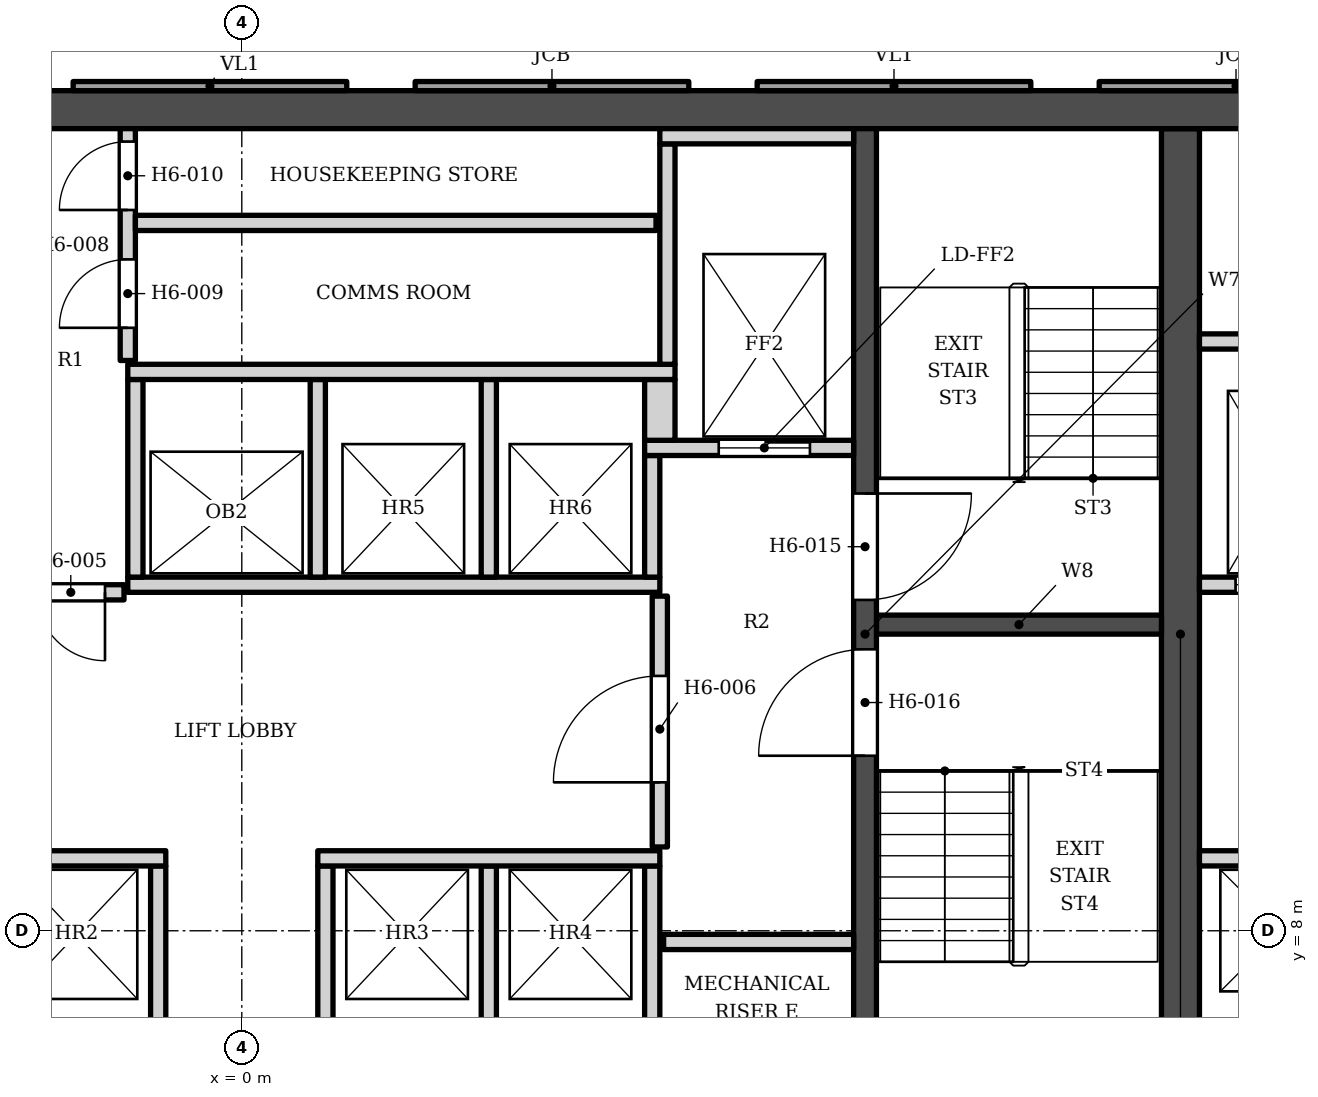
"""IFC4 building model, lengths in metres.
Left out: names, types, materials, properties, quantities, classifications, styles, units other than length and angle.
Written with IfcOpenShell. Run it as: python <this file> out.ifc"""

import sys

from ifc_helpers import new_model, si_unit, direction, frame, frame_2d, origin, place, context, subcontext, project, spatial, polyline, rectangle, outline, extrude, element, fill, save


model = new_model("IFC4")
c1 = context("Model", 3, precision=1e-05, world=origin(), true_north=direction((0.0, 1.0)))
c2 = subcontext(c1, "Body", "Model", "MODEL_VIEW")
j1 = project(units=[si_unit("LENGTHUNIT", "METRE"), si_unit("PLANEANGLEUNIT", "RADIAN")], contexts=[c1])
p1 = place(None, origin())
s1 = spatial("IfcSite", under=j1, at=p1, CompositionType="ELEMENT")
p2 = place(p1, origin())
s2 = spatial("IfcBuilding", under=s1, at=p2, CompositionType="ELEMENT")
p3 = place(p2, frame((0.0, 0.0, 102.0)))
s3 = spatial("IfcBuildingStorey", under=s2, at=p3, CompositionType="ELEMENT", Elevation=102.0)
p4 = place(p3, frame((-16.9, 18.802, 0.0), z_axis=(0.0, 0.0, 1.0), x_axis=(1.0, 0.0, 0.0)))
e1 = element("IfcWall", 1, at=p4, inside=s3, PredefinedType="SHEAR", context=c2, shape_type="SweptSolid", body=[
    extrude(rectangle(XDim=33.8, YDim=0.5, at=frame_2d((16.9, 0.0))), origin(), (0.0, 0.0, 1.0), 3.4),
])
p5 = place(p3, frame((12.35, 5.253, 0.0), z_axis=(0.0, 0.0, 1.0), x_axis=(0.0, 1.0, 0.0)))
e2 = element("IfcWall", 2, at=p5, inside=s3, PredefinedType="SHEAR", context=c2, shape_type="SweptSolid", body=[
    extrude(rectangle(XDim=13.3, YDim=0.5, at=frame_2d((6.65, 0.0))), origin(), (0.0, 0.0, 1.0), 3.4),
])
p6 = place(p3, frame((8.2, 5.253, 0.0), z_axis=(0.0, 0.0, 1.0), x_axis=(0.0, 1.0, 0.0)))
e3 = element("IfcWall", 3, at=p6, inside=s3, PredefinedType="SHEAR", context=c2, shape_type="SweptSolid", body=[
    extrude(rectangle(XDim=13.3, YDim=0.3, at=frame_2d((6.65, 0.0))), origin(), (0.0, 0.0, 1.0), 3.4),
])
p7 = place(p6, frame((7.1, 0.0, 0.0)))
e4 = element("IfcOpeningElement", 4, at=p7, cuts=e3, PredefinedType="OPENING", context=c2, shape_type="SweptSolid", body=[
    extrude(rectangle(XDim=1.4, YDim=2.1, at=frame_2d((0.7, 1.05))), frame((0.0, 0.16, 0.0), z_axis=(0.0, -1.0, 0.0), x_axis=(1.0, 0.0, 0.0)), (0.0, 0.0, 1.0), 0.32),
])
p8 = place(p6, frame((5.05, 0.0, 0.0)))
e5 = element("IfcOpeningElement", 5, at=p8, cuts=e3, PredefinedType="OPENING", context=c2, shape_type="SweptSolid", body=[
    extrude(rectangle(XDim=1.4, YDim=2.1, at=frame_2d((0.7, 1.05))), frame((0.0, 0.16, 0.0), z_axis=(0.0, -1.0, 0.0), x_axis=(1.0, 0.0, 0.0)), (0.0, 0.0, 1.0), 0.32),
])
p9 = place(p3, frame((8.35, 12.028, 0.0), z_axis=(0.0, 0.0, 1.0), x_axis=(1.0, 0.0, 0.0)))
e6 = element("IfcWall", 6, at=p9, inside=s3, PredefinedType="SHEAR", context=c2, shape_type="SweptSolid", body=[
    extrude(rectangle(XDim=3.75, YDim=0.25, at=frame_2d((1.875, 0.0))), origin(), (0.0, 0.0, 1.0), 3.4),
])
p10 = place(p3, origin())
e7 = element("IfcWall", 7, at=p10, inside=s3, PredefinedType="SOLIDWALL", context=c2, shape_type="SweptSolid", body=[
    extrude(outline(polyline([(11.281, 19.173), (11.281, 19.052), (14.881, 19.052), (14.881, 19.173), (11.281, 19.173)])), origin(), (0.0, 0.0, 1.0), 2.65),
])
p11 = place(p3, origin())
e8 = element("IfcWall", 8, at=p11, inside=s3, PredefinedType="ELEMENTEDWALL", context=c2, shape_type="SweptSolid", body=[
    extrude(outline(polyline([(6.781, 19.173), (6.781, 19.052), (10.381, 19.052), (10.381, 19.173), (6.781, 19.173)])), origin(), (0.0, 0.0, 1.0), 2.65),
])
p12 = place(p3, origin())
e9 = element("IfcWall", 9, at=p12, inside=s3, PredefinedType="SOLIDWALL", context=c2, shape_type="SweptSolid", body=[
    extrude(outline(polyline([(2.281, 19.173), (2.281, 19.052), (5.881, 19.052), (5.881, 19.173), (2.281, 19.173)])), origin(), (0.0, 0.0, 1.0), 2.65),
])
p13 = place(p3, origin())
e10 = element("IfcWall", 10, at=p13, inside=s3, PredefinedType="ELEMENTEDWALL", context=c2, shape_type="SweptSolid", body=[
    extrude(outline(polyline([(-2.219, 19.173), (-2.219, 19.052), (1.381, 19.052), (1.381, 19.173), (-2.219, 19.173)])), origin(), (0.0, 0.0, 1.0), 2.65),
])
for number, where, z_axis, x_axis in (
    (11, (-1.1, 6.353, 0.0), (0.0, 0.0, 1.0), (0.0, 1.0, 0.0)),
    (12, (1.1, 6.353, 0.0), (0.0, 0.0, 1.0), (0.0, 1.0, 0.0)),
    (13, (3.25, 6.353, 0.0), (0.0, 0.0, 1.0), (0.0, 1.0, 0.0)),
    (14, (5.4, 6.353, 0.0), (0.0, 0.0, 1.0), (0.0, 1.0, 0.0)),
    (15, (5.55, 7.853, 0.0), (0.0, 0.0, 1.0), (1.0, 0.0, 0.0)),
):
    element("IfcWall", number, at=place(p3, frame(where, z_axis=z_axis, x_axis=x_axis)), inside=s3, PredefinedType="SOLIDWALL", context=c2, shape_type="SweptSolid", body=[
        extrude(rectangle(XDim=2.5, YDim=0.2, at=frame_2d((1.25, 0.0))), origin(), (0.0, 0.0, 1.0), 3.23),
    ])
for number, where, z_axis, x_axis in (
    (16, (-5.5, 8.953, 0.0), (0.0, 0.0, 1.0), (1.0, 0.0, 0.0)),
    (17, (1.0, 8.953, 0.0), (0.0, 0.0, 1.0), (1.0, 0.0, 0.0)),
):
    element("IfcWall", number, at=place(p3, frame(where, z_axis=z_axis, x_axis=x_axis)), inside=s3, PredefinedType="SOLIDWALL", context=c2, shape_type="SweptSolid", body=[
        extrude(rectangle(XDim=4.5, YDim=0.2, at=frame_2d((2.25, 0.0))), origin(), (0.0, 0.0, 1.0), 3.23),
    ])
p14 = place(p3, frame((12.6, 8.953, 0.0), z_axis=(0.0, 0.0, 1.0), x_axis=(1.0, 0.0, 0.0)))
e18 = element("IfcWall", 18, at=p14, inside=s3, PredefinedType="SOLIDWALL", context=c2, shape_type="SweptSolid", body=[
    extrude(rectangle(XDim=4.3, YDim=0.2, at=frame_2d((2.15, 0.0))), origin(), (0.0, 0.0, 1.0), 3.23),
])
p15 = place(p14, frame((0.525, 0.0, 0.0)))
e19 = element("IfcOpeningElement", 19, at=p15, cuts=e18, PredefinedType="OPENING", context=c2, shape_type="SweptSolid", body=[
    extrude(rectangle(XDim=1.1, YDim=2.1, at=frame_2d((0.55, 1.05))), frame((0.0, 0.11, 0.0), z_axis=(0.0, -1.0, 0.0), x_axis=(1.0, 0.0, 0.0)), (0.0, 0.0, 1.0), 0.22),
])
p16 = place(p14, frame((2.775, 0.0, 0.0)))
e20 = element("IfcOpeningElement", 20, at=p16, cuts=e18, PredefinedType="OPENING", context=c2, shape_type="SweptSolid", body=[
    extrude(rectangle(XDim=1.1, YDim=2.1, at=frame_2d((0.55, 1.05))), frame((0.0, 0.11, 0.0), z_axis=(0.0, -1.0, 0.0), x_axis=(1.0, 0.0, 0.0)), (0.0, 0.0, 1.0), 0.22),
])
p17 = place(p3, frame((5.5, 9.103, 0.0), z_axis=(0.0, 0.0, 1.0), x_axis=(0.0, 1.0, 0.0)))
e21 = element("IfcWall", 21, at=p17, inside=s3, PredefinedType="SOLIDWALL", context=c2, shape_type="SweptSolid", body=[
    extrude(rectangle(XDim=3.3, YDim=0.2, at=frame_2d((1.65, 0.0))), origin(), (0.0, 0.0, 1.0), 3.23),
])
p18 = place(p17, frame((0.85, 0.0, 0.0)))
e22 = element("IfcOpeningElement", 22, at=p18, cuts=e21, PredefinedType="OPENING", context=c2, shape_type="SweptSolid", body=[
    extrude(rectangle(XDim=1.4, YDim=2.1, at=frame_2d((0.7, 1.05))), frame((0.0, 0.11, 0.0), z_axis=(0.0, -1.0, 0.0), x_axis=(1.0, 0.0, 0.0)), (0.0, 0.0, 1.0), 0.22),
])
p19 = place(p3, frame((-2.95, 12.453, 0.0), z_axis=(0.0, 0.0, 1.0), x_axis=(1.0, 0.0, 0.0)))
e23 = element("IfcWall", 23, at=p19, inside=s3, PredefinedType="SOLIDWALL", context=c2, shape_type="SweptSolid", body=[
    extrude(rectangle(XDim=1.4, YDim=0.2, at=frame_2d((0.7, 0.0))), origin(), (0.0, 0.0, 1.0), 3.23),
])
p20 = place(p19, frame((0.25, 0.0, 0.0)))
e24 = element("IfcOpeningElement", 24, at=p20, cuts=e23, PredefinedType="OPENING", context=c2, shape_type="SweptSolid", body=[
    extrude(rectangle(XDim=0.9, YDim=2.1, at=frame_2d((0.45, 1.05))), frame((0.0, 0.11, 0.0), z_axis=(0.0, -1.0, 0.0), x_axis=(1.0, 0.0, 0.0)), (0.0, 0.0, 1.0), 0.22),
])
p21 = place(p3, frame((-1.5, 12.552, 0.0), z_axis=(0.0, 0.0, 1.0), x_axis=(1.0, 0.0, 0.0)))
e25 = element("IfcWall", 25, at=p21, inside=s3, PredefinedType="SOLIDWALL", context=c2, shape_type="SweptSolid", body=[
    extrude(rectangle(XDim=7.0, YDim=0.2, at=frame_2d((3.5, 0.0))), origin(), (0.0, 0.0, 1.0), 3.23),
])
p22 = place(p3, frame((12.6, 12.552, 0.0), z_axis=(0.0, 0.0, 1.0), x_axis=(1.0, 0.0, 0.0)))
e26 = element("IfcWall", 26, at=p22, inside=s3, PredefinedType="SOLIDWALL", context=c2, shape_type="SweptSolid", body=[
    extrude(rectangle(XDim=4.3, YDim=0.2, at=frame_2d((2.15, 0.0))), origin(), (0.0, 0.0, 1.0), 3.23),
])
p23 = place(p22, frame((0.475, 0.0, 0.0)))
e27 = element("IfcOpeningElement", 27, at=p23, cuts=e26, PredefinedType="OPENING", context=c2, shape_type="SweptSolid", body=[
    extrude(rectangle(XDim=1.2, YDim=2.1, at=frame_2d((0.6, 1.05))), frame((0.0, 0.11, 0.0), z_axis=(0.0, -1.0, 0.0), x_axis=(1.0, 0.0, 0.0)), (0.0, 0.0, 1.0), 0.22),
])
p24 = place(p22, frame((2.625, 0.0, 0.0)))
e28 = element("IfcOpeningElement", 28, at=p24, cuts=e26, PredefinedType="OPENING", context=c2, shape_type="SweptSolid", body=[
    extrude(rectangle(XDim=1.4, YDim=2.1, at=frame_2d((0.7, 1.05))), frame((0.0, 0.11, 0.0), z_axis=(0.0, -1.0, 0.0), x_axis=(1.0, 0.0, 0.0)), (0.0, 0.0, 1.0), 0.22),
])
for number, where, z_axis, x_axis in (
    (29, (-1.4, 12.653, 0.0), (0.0, 0.0, 1.0), (0.0, 1.0, 0.0)),
    (30, (1.0, 12.653, 0.0), (0.0, 0.0, 1.0), (0.0, 1.0, 0.0)),
    (31, (3.25, 12.653, 0.0), (0.0, 0.0, 1.0), (0.0, 1.0, 0.0)),
):
    element("IfcWall", number, at=place(p3, frame(where, z_axis=z_axis, x_axis=x_axis)), inside=s3, PredefinedType="SOLIDWALL", context=c2, shape_type="SweptSolid", body=[
        extrude(rectangle(XDim=2.6, YDim=0.2, at=frame_2d((1.3, 0.0))), origin(), (0.0, 0.0, 1.0), 3.23),
    ])
p25 = place(p3, frame((5.4, 12.653, 0.0), z_axis=(0.0, 0.0, 1.0), x_axis=(0.0, 1.0, 0.0)))
e32 = element("IfcWall", 32, at=p25, inside=s3, PredefinedType="SOLIDWALL", context=c2, shape_type="SweptSolid", body=[
    extrude(rectangle(XDim=1.6, YDim=0.2, at=frame_2d((0.8, 0.0))), origin(), (0.0, 0.0, 1.0), 3.23),
])
p26 = place(p3, frame((5.3, 14.353, 0.0), z_axis=(0.0, 0.0, 1.0), x_axis=(1.0, 0.0, 0.0)))
e33 = element("IfcWall", 33, at=p26, inside=s3, PredefinedType="SOLIDWALL", context=c2, shape_type="SweptSolid", body=[
    extrude(rectangle(XDim=2.75, YDim=0.2, at=frame_2d((1.375, 0.0))), origin(), (0.0, 0.0, 1.0), 3.23),
])
p27 = place(p26, frame((0.975, 0.0, 0.0)))
e34 = element("IfcOpeningElement", 34, at=p27, cuts=e33, PredefinedType="OPENING", context=c2, shape_type="SweptSolid", body=[
    extrude(rectangle(XDim=1.2, YDim=2.1, at=frame_2d((0.6, 1.05))), frame((0.0, 0.11, 0.0), z_axis=(0.0, -1.0, 0.0), x_axis=(1.0, 0.0, 0.0)), (0.0, 0.0, 1.0), 0.22),
])
p28 = place(p3, frame((5.5, 14.453, 0.0), z_axis=(0.0, 0.0, 1.0), x_axis=(0.0, 1.0, 0.0)))
e35 = element("IfcWall", 35, at=p28, inside=s3, PredefinedType="SOLIDWALL", context=c2, shape_type="SweptSolid", body=[
    extrude(rectangle(XDim=0.8, YDim=0.4, at=frame_2d((0.4, 0.0))), origin(), (0.0, 0.0, 1.0), 3.23),
])
p29 = place(p3, frame((-1.5, 15.353, 0.0), z_axis=(0.0, 0.0, 1.0), x_axis=(1.0, 0.0, 0.0)))
e36 = element("IfcWall", 36, at=p29, inside=s3, PredefinedType="SOLIDWALL", context=c2, shape_type="SweptSolid", body=[
    extrude(rectangle(XDim=7.2, YDim=0.2, at=frame_2d((3.6, 0.0))), origin(), (0.0, 0.0, 1.0), 3.23),
])
p30 = place(p3, frame((5.6, 15.453, 0.0), z_axis=(0.0, 0.0, 1.0), x_axis=(0.0, 1.0, 0.0)))
e37 = element("IfcWall", 37, at=p30, inside=s3, PredefinedType="SOLIDWALL", context=c2, shape_type="SweptSolid", body=[
    extrude(rectangle(XDim=2.9, YDim=0.2, at=frame_2d((1.45, 0.0))), origin(), (0.0, 0.0, 1.0), 3.23),
])
p31 = place(p3, frame((-1.5, 15.503, 0.0), z_axis=(0.0, 0.0, 1.0), x_axis=(0.0, 1.0, 0.0)))
e38 = element("IfcWall", 38, at=p31, inside=s3, PredefinedType="SOLIDWALL", context=c2, shape_type="SweptSolid", body=[
    extrude(rectangle(XDim=3.05, YDim=0.2, at=frame_2d((1.525, 0.0))), origin(), (0.0, 0.0, 1.0), 3.23),
])
p32 = place(p31, frame((0.43, 0.0, 0.0)))
e39 = element("IfcOpeningElement", 39, at=p32, cuts=e38, PredefinedType="OPENING", context=c2, shape_type="SweptSolid", body=[
    extrude(rectangle(XDim=0.9, YDim=2.1, at=frame_2d((0.45, 1.05))), frame((0.0, 0.11, 0.0), z_axis=(0.0, -1.0, 0.0), x_axis=(1.0, 0.0, 0.0)), (0.0, 0.0, 1.0), 0.22),
])
p33 = place(p31, frame((1.98, 0.0, 0.0)))
e40 = element("IfcOpeningElement", 40, at=p33, cuts=e38, PredefinedType="OPENING", context=c2, shape_type="SweptSolid", body=[
    extrude(rectangle(XDim=0.9, YDim=2.1, at=frame_2d((0.45, 1.05))), frame((0.0, 0.11, 0.0), z_axis=(0.0, -1.0, 0.0), x_axis=(1.0, 0.0, 0.0)), (0.0, 0.0, 1.0), 0.22),
])
p34 = place(p3, frame((12.6, 15.753, 0.0), z_axis=(0.0, 0.0, 1.0), x_axis=(1.0, 0.0, 0.0)))
e41 = element("IfcWall", 41, at=p34, inside=s3, PredefinedType="SOLIDWALL", context=c2, shape_type="SweptSolid", body=[
    extrude(rectangle(XDim=4.3, YDim=0.2, at=frame_2d((2.15, 0.0))), origin(), (0.0, 0.0, 1.0), 3.23),
])
p35 = place(p3, frame((-1.4, 17.312, 0.0), z_axis=(0.0, 0.0, 1.0), x_axis=(1.0, 0.0, 0.0)))
e42 = element("IfcWall", 42, at=p35, inside=s3, PredefinedType="SOLIDWALL", context=c2, shape_type="SweptSolid", body=[
    extrude(rectangle(XDim=6.85, YDim=0.2, at=frame_2d((3.425, 0.0))), origin(), (0.0, 0.0, 1.0), 3.23),
])
p36 = place(p3, frame((5.5, 18.453, 0.0), z_axis=(0.0, 0.0, 1.0), x_axis=(1.0, 0.0, 0.0)))
e43 = element("IfcWall", 43, at=p36, inside=s3, PredefinedType="SOLIDWALL", context=c2, shape_type="SweptSolid", body=[
    extrude(rectangle(XDim=2.55, YDim=0.2, at=frame_2d((1.275, 0.0))), origin(), (0.0, 0.0, 1.0), 3.23),
])
p37 = place(p27, origin())
e44 = element("IfcDoor", 44, at=p37, inside=s3, OperationType="DOUBLE_DOOR_SLIDING", PredefinedType="DOOR", context=c2, shape_type="SweptSolid", body=[
    extrude(rectangle(XDim=1.2, YDim=2.1, at=frame_2d((0.6, 1.05))), frame((0.0, 0.025, 0.0), z_axis=(0.0, -1.0, 0.0), x_axis=(1.0, 0.0, 0.0)), (0.0, 0.0, 1.0), 0.05),
])
fill(e34, e44)
p38 = place(p23, origin())
e45 = element("IfcDoor", 45, at=p38, inside=s3, OperationType="DOUBLE_DOOR_SLIDING", PredefinedType="DOOR", context=c2, shape_type="SweptSolid", body=[
    extrude(rectangle(XDim=1.2, YDim=2.1, at=frame_2d((0.6, 1.05))), frame((0.0, 0.025, 0.0), z_axis=(0.0, -1.0, 0.0), x_axis=(1.0, 0.0, 0.0)), (0.0, 0.0, 1.0), 0.05),
])
fill(e27, e45)
p39 = place(p7, origin())
e46 = element("IfcDoor", 46, at=p39, inside=s3, OperationType="SINGLE_SWING_RIGHT", PredefinedType="DOOR", context=c2, shape_type="SweptSolid", body=[
    extrude(rectangle(XDim=1.4, YDim=2.1, at=frame_2d((0.7, 1.05))), frame((0.0, 0.025, 0.0), z_axis=(0.0, -1.0, 0.0), x_axis=(1.0, 0.0, 0.0)), (0.0, 0.0, 1.0), 0.05),
])
fill(e4, e46)
p40 = place(p8, origin())
e47 = element("IfcDoor", 47, at=p40, inside=s3, OperationType="SINGLE_SWING_LEFT", PredefinedType="DOOR", context=c2, shape_type="SweptSolid", body=[
    extrude(rectangle(XDim=1.4, YDim=2.1, at=frame_2d((0.7, 1.05))), frame((0.0, 0.025, 0.0), z_axis=(0.0, -1.0, 0.0), x_axis=(1.0, 0.0, 0.0)), (0.0, 0.0, 1.0), 0.05),
])
fill(e5, e47)
p41 = place(p20, origin())
e48 = element("IfcDoor", 48, at=p41, inside=s3, OperationType="SINGLE_SWING_RIGHT", PredefinedType="DOOR", context=c2, shape_type="SweptSolid", body=[
    extrude(rectangle(XDim=0.9, YDim=2.1, at=frame_2d((0.45, 1.05))), frame((0.0, 0.025, 0.0), z_axis=(0.0, -1.0, 0.0), x_axis=(1.0, 0.0, 0.0)), (0.0, 0.0, 1.0), 0.05),
])
fill(e24, e48)
p42 = place(p18, origin())
e49 = element("IfcDoor", 49, at=p42, inside=s3, OperationType="SINGLE_SWING_LEFT", PredefinedType="DOOR", context=c2, shape_type="SweptSolid", body=[
    extrude(rectangle(XDim=1.4, YDim=2.1, at=frame_2d((0.7, 1.05))), frame((0.0, 0.025, 0.0), z_axis=(0.0, -1.0, 0.0), x_axis=(1.0, 0.0, 0.0)), (0.0, 0.0, 1.0), 0.05),
])
fill(e22, e49)
p43 = place(p32, origin())
e50 = element("IfcDoor", 50, at=p43, inside=s3, OperationType="SINGLE_SWING_LEFT", PredefinedType="DOOR", context=c2, shape_type="SweptSolid", body=[
    extrude(rectangle(XDim=0.9, YDim=2.1, at=frame_2d((0.45, 1.05))), frame((0.0, 0.025, 0.0), z_axis=(0.0, -1.0, 0.0), x_axis=(1.0, 0.0, 0.0)), (0.0, 0.0, 1.0), 0.05),
])
fill(e39, e50)
p44 = place(p33, origin())
e51 = element("IfcDoor", 51, at=p44, inside=s3, OperationType="SINGLE_SWING_LEFT", PredefinedType="DOOR", context=c2, shape_type="SweptSolid", body=[
    extrude(rectangle(XDim=0.9, YDim=2.1, at=frame_2d((0.45, 1.05))), frame((0.0, 0.025, 0.0), z_axis=(0.0, -1.0, 0.0), x_axis=(1.0, 0.0, 0.0)), (0.0, 0.0, 1.0), 0.05),
])
fill(e40, e51)
save(model, sys.argv[1])
